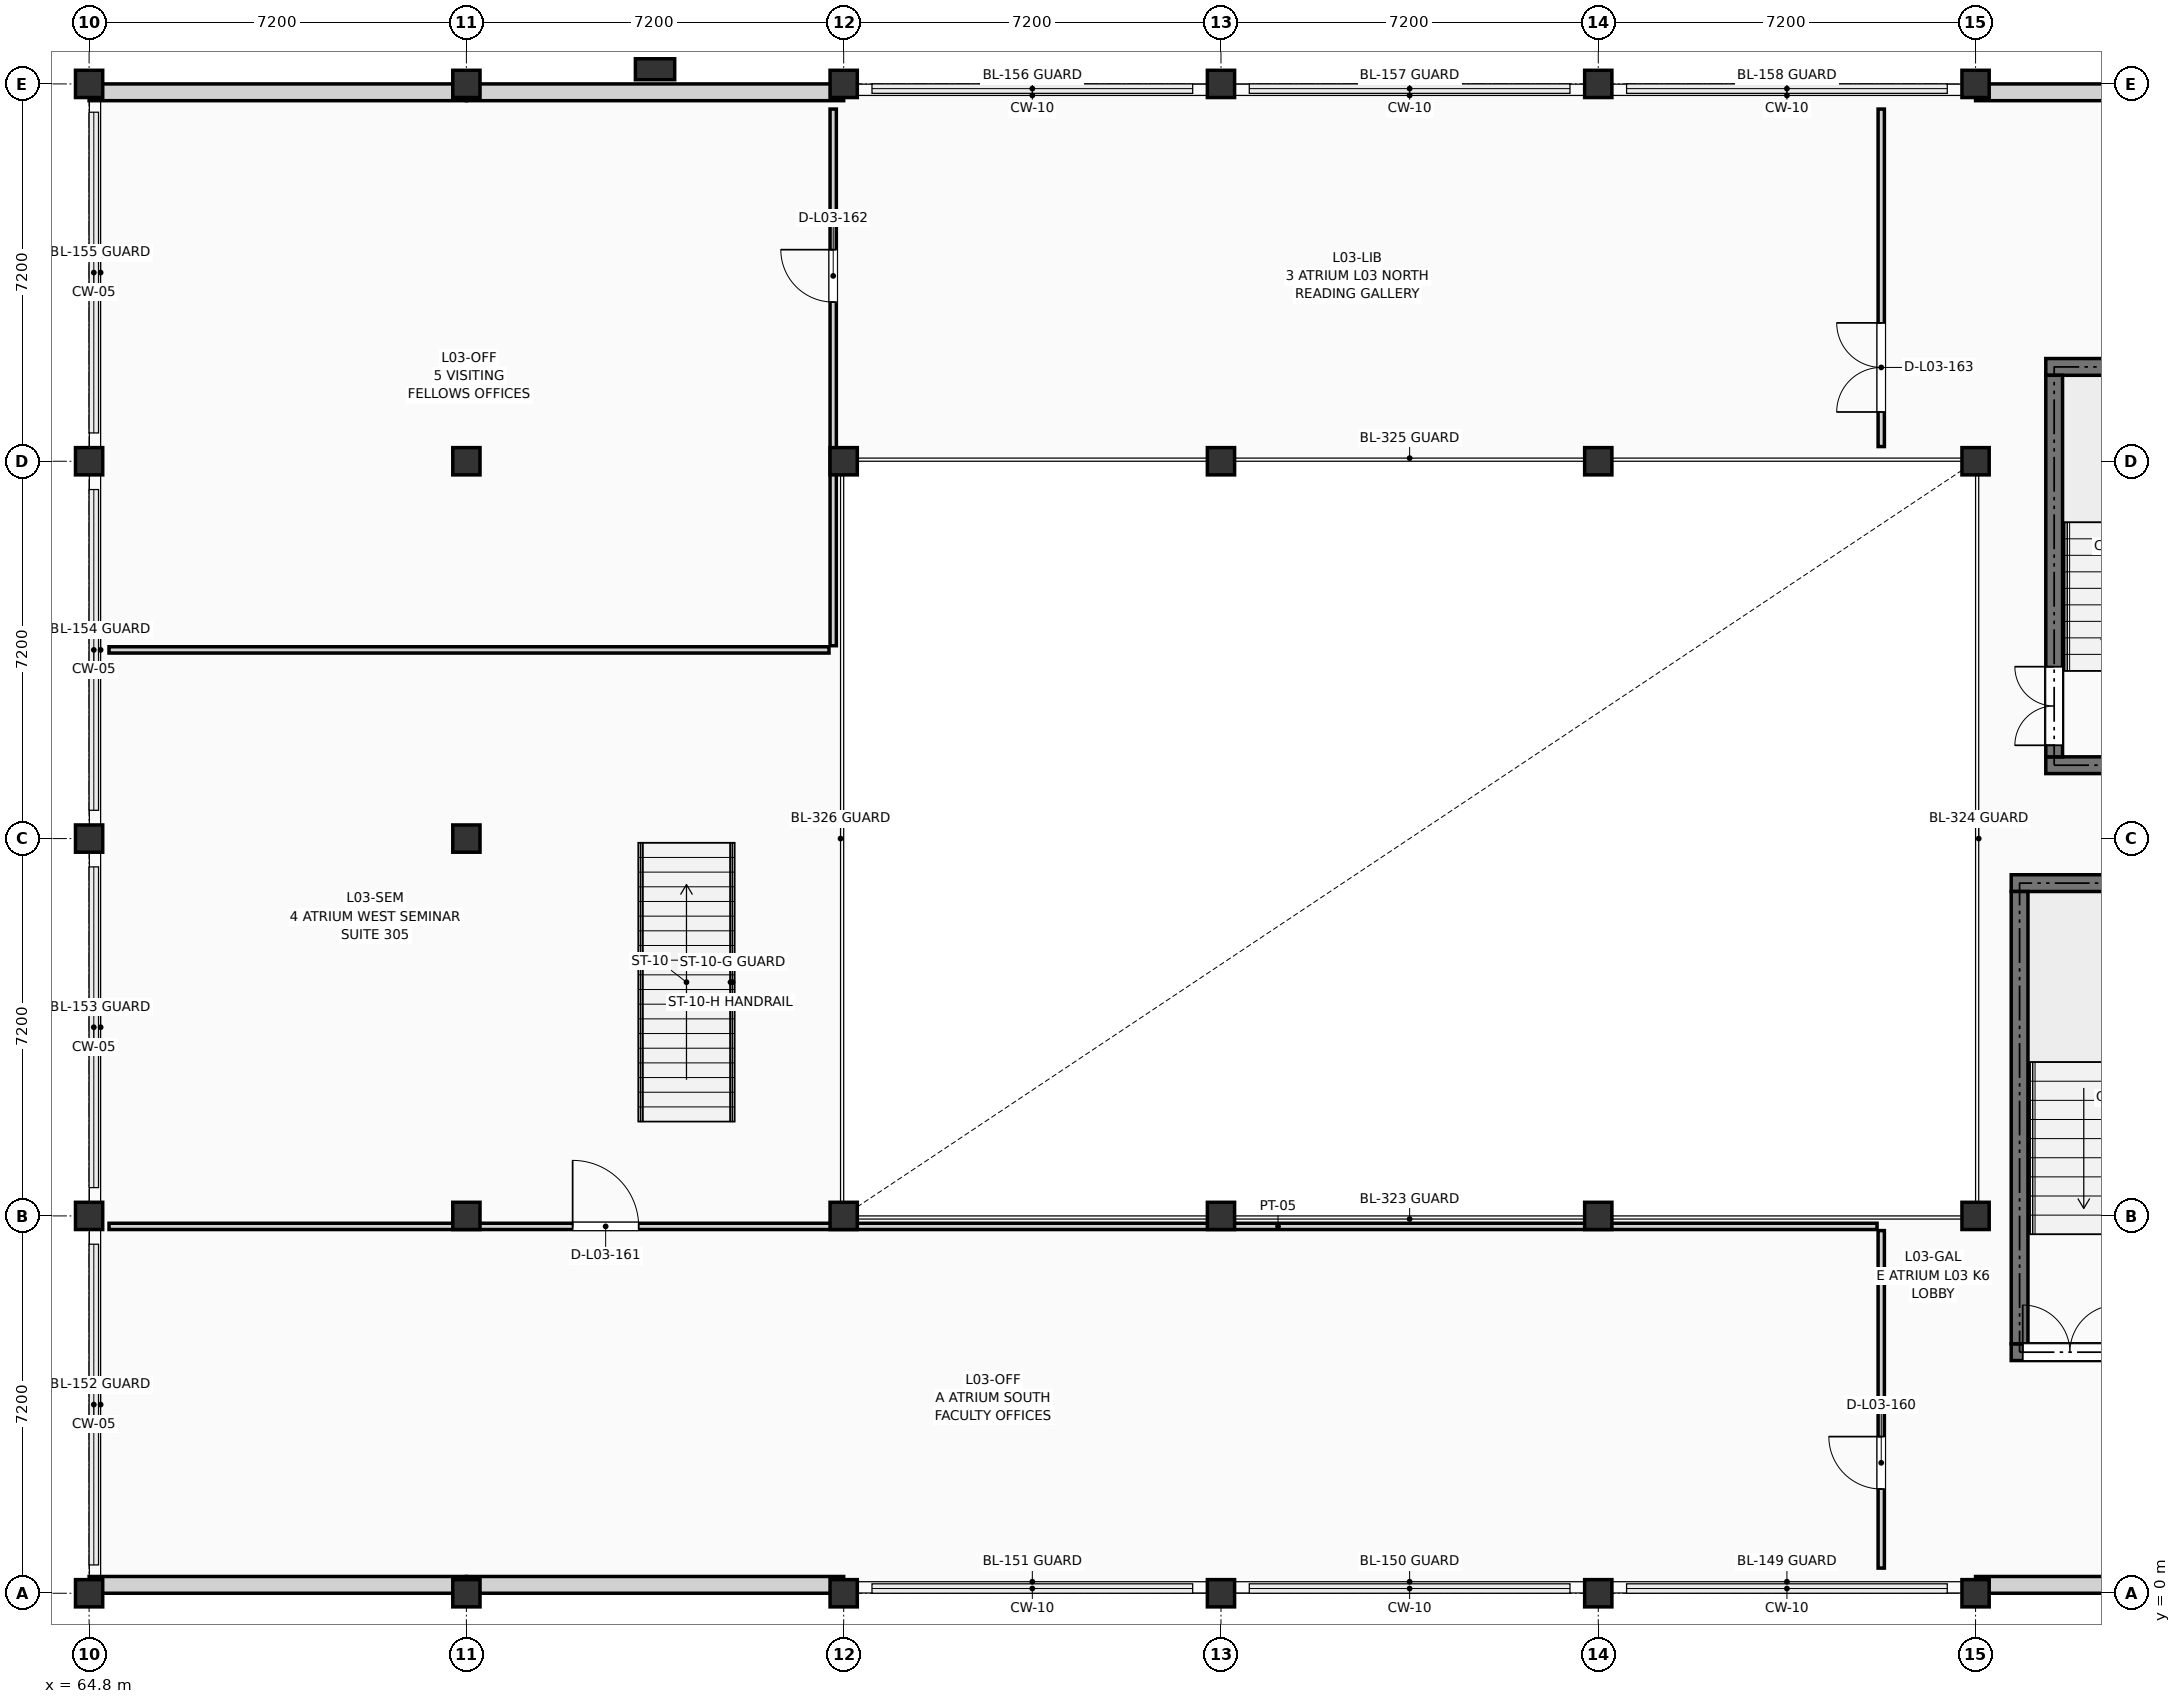
"""IFC4 building model, lengths in metres.
Left out: names, types, materials, properties, quantities, classifications, styles, units other than length and angle.
Written with IfcOpenShell. Run it as: python <this file> out.ifc"""

import sys

from ifc_helpers import new_model, si_unit, direction, frame, frame_2d, origin, origin_2d, place, context, subcontext, project, spatial, rectangle, extrude, element, fill, save


model = new_model("IFC4")
c1 = context("Model", 3, precision=1e-05, world=origin(), true_north=direction((0.0, 1.0)))
c2 = subcontext(c1, "Body", "Model", "MODEL_VIEW")
j1 = project(units=[si_unit("LENGTHUNIT", "METRE"), si_unit("PLANEANGLEUNIT", "RADIAN")], contexts=[c1])
p1 = place(None, origin())
s1 = spatial("IfcSite", under=j1, at=p1, CompositionType="ELEMENT")
p2 = place(p1, origin())
s2 = spatial("IfcBuilding", under=s1, at=p2, CompositionType="ELEMENT")
p3 = place(p2, frame((0.0, 0.0, 12.15)))
s3 = spatial("IfcBuildingStorey", under=s2, at=p3, CompositionType="ELEMENT", Elevation=12.15)
for number, where, z_axis, x_axis in (
    (1, (64.8, 0.0, 0.0), (0.0, 0.0, 1.0), (1.0, 0.0, 0.0)),
    (2, (64.8, 7.2, 0.0), (0.0, 0.0, 1.0), (1.0, 0.0, 0.0)),
    (3, (64.8, 14.4, 0.0), (0.0, 0.0, 1.0), (1.0, 0.0, 0.0)),
    (4, (64.8, 21.6, 0.0), (0.0, 0.0, 1.0), (1.0, 0.0, 0.0)),
    (5, (64.8, 28.8, 0.0), (0.0, 0.0, 1.0), (1.0, 0.0, 0.0)),
    (6, (72.0, 0.0, 0.0), (0.0, 0.0, 1.0), (1.0, 0.0, 0.0)),
    (7, (72.0, 7.2, 0.0), (0.0, 0.0, 1.0), (1.0, 0.0, 0.0)),
    (8, (72.0, 14.4, 0.0), (0.0, 0.0, 1.0), (1.0, 0.0, 0.0)),
    (9, (72.0, 21.6, 0.0), (0.0, 0.0, 1.0), (1.0, 0.0, 0.0)),
    (10, (72.0, 28.8, 0.0), (0.0, 0.0, 1.0), (1.0, 0.0, 0.0)),
    (11, (79.2, 0.0, 0.0), (0.0, 0.0, 1.0), (1.0, 0.0, 0.0)),
    (12, (79.2, 7.2, 0.0), (0.0, 0.0, 1.0), (1.0, 0.0, 0.0)),
    (13, (79.2, 21.6, 0.0), (0.0, 0.0, 1.0), (1.0, 0.0, 0.0)),
    (14, (79.2, 28.8, 0.0), (0.0, 0.0, 1.0), (1.0, 0.0, 0.0)),
    (15, (86.4, 0.0, 0.0), (0.0, 0.0, 1.0), (1.0, 0.0, 0.0)),
    (16, (86.4, 7.2, 0.0), (0.0, 0.0, 1.0), (1.0, 0.0, 0.0)),
    (17, (86.4, 21.6, 0.0), (0.0, 0.0, 1.0), (1.0, 0.0, 0.0)),
    (18, (86.4, 28.8, 0.0), (0.0, 0.0, 1.0), (1.0, 0.0, 0.0)),
    (19, (93.6, 0.0, 0.0), (0.0, 0.0, 1.0), (1.0, 0.0, 0.0)),
    (20, (93.6, 7.2, 0.0), (0.0, 0.0, 1.0), (1.0, 0.0, 0.0)),
    (21, (93.6, 21.6, 0.0), (0.0, 0.0, 1.0), (1.0, 0.0, 0.0)),
    (22, (93.6, 28.8, 0.0), (0.0, 0.0, 1.0), (1.0, 0.0, 0.0)),
    (23, (100.8, 0.0, 0.0), (0.0, 0.0, 1.0), (1.0, 0.0, 0.0)),
    (24, (100.8, 7.2, 0.0), (0.0, 0.0, 1.0), (1.0, 0.0, 0.0)),
    (25, (100.8, 21.6, 0.0), (0.0, 0.0, 1.0), (1.0, 0.0, 0.0)),
    (26, (100.8, 28.8, 0.0), (0.0, 0.0, 1.0), (1.0, 0.0, 0.0)),
):
    element("IfcColumn", number, at=place(p3, frame(where, z_axis=z_axis, x_axis=x_axis)), inside=s3, PredefinedType="COLUMN", context=c2, shape_type="SweptSolid", body=[
        extrude(rectangle(XDim=0.52, YDim=0.52, at=origin_2d()), origin(), (0.0, 0.0, 1.0), 3.6),
    ])
p4 = place(p3, frame((75.6, 29.08, 0.0), z_axis=(0.0, 0.0, 1.0), x_axis=(0.0, 1.0, 0.0)))
e27 = element("IfcColumn", 27, at=p4, inside=s3, PredefinedType="PILASTER", context=c2, shape_type="SweptSolid", body=[
    extrude(rectangle(XDim=0.4, YDim=0.75, at=origin_2d()), origin(), (0.0, 0.0, 1.0), 3.6),
])
for number, where, z_axis, x_axis in (
    (28, (100.8, 0.16, 0.0), (0.0, 0.0, 1.0), (1.0, 0.0, 0.0)),
    (29, (72.0, 0.16, 0.0), (0.0, 0.0, 1.0), (1.0, 0.0, 0.0)),
    (30, (64.8, 0.16, 0.0), (0.0, 0.0, 1.0), (1.0, 0.0, 0.0)),
    (31, (64.8, 28.64, 0.0), (0.0, 0.0, 1.0), (1.0, 0.0, 0.0)),
    (32, (72.0, 28.64, 0.0), (0.0, 0.0, 1.0), (1.0, 0.0, 0.0)),
    (33, (100.8, 28.64, 0.0), (0.0, 0.0, 1.0), (1.0, 0.0, 0.0)),
):
    element("IfcWall", number, at=place(p3, frame(where, z_axis=z_axis, x_axis=x_axis)), inside=s3, PredefinedType="SOLIDWALL", context=c2, shape_type="SweptSolid", body=[
        extrude(rectangle(XDim=7.2, YDim=0.32, at=frame_2d((3.6, 0.0))), origin(), (0.0, 0.0, 1.0), 2.84),
    ])
for number, where, z_axis, x_axis in (
    (34, (102.14, 15.8, 0.0), (0.0, 0.0, 1.0), (1.0, 0.0, 0.0)),
    (35, (102.14, 23.4, 0.0), (0.0, 0.0, 1.0), (1.0, 0.0, 0.0)),
):
    element("IfcWall", number, at=place(p3, frame(where, z_axis=z_axis, x_axis=x_axis)), inside=s3, PredefinedType="SHEAR", context=c2, shape_type="SweptSolid", body=[
        extrude(rectangle(XDim=4.44, YDim=0.32, at=frame_2d((2.22, 0.0))), origin(), (0.0, 0.0, 1.0), 3.39),
    ])
p5 = place(p3, frame((102.3, 15.96, 0.0), z_axis=(0.0, 0.0, 1.0), x_axis=(0.0, 1.0, 0.0)))
e36 = element("IfcWall", 36, at=p5, inside=s3, PredefinedType="SHEAR", context=c2, shape_type="SweptSolid", body=[
    extrude(rectangle(XDim=7.28, YDim=0.32, at=frame_2d((3.64, 0.0))), origin(), (0.0, 0.0, 1.0), 3.39),
])
p6 = place(p5, frame((0.22, 0.0, 0.0)))
e37 = element("IfcOpeningElement", 37, at=p6, cuts=e36, PredefinedType="OPENING", context=c2, shape_type="SweptSolid", body=[
    extrude(rectangle(XDim=1.5, YDim=2.2, at=frame_2d((0.75, 1.1))), frame((0.0, 0.172, 0.0), z_axis=(0.0, -1.0, 0.0), x_axis=(1.0, 0.0, 0.0)), (0.0, 0.0, 1.0), 0.344),
])
p7 = place(p3, frame((101.48, 4.6, 0.0), z_axis=(0.0, 0.0, 1.0), x_axis=(1.0, 0.0, 0.0)))
e38 = element("IfcWall", 38, at=p7, inside=s3, PredefinedType="SHEAR", context=c2, shape_type="SweptSolid", body=[
    extrude(rectangle(XDim=5.84, YDim=0.32, at=frame_2d((2.92, 0.0))), origin(), (0.0, 0.0, 1.0), 3.39),
])
p8 = place(p7, frame((0.22, 0.0, 0.0)))
e39 = element("IfcOpeningElement", 39, at=p8, cuts=e38, PredefinedType="OPENING", context=c2, shape_type="SweptSolid", body=[
    extrude(rectangle(XDim=1.8, YDim=2.2, at=frame_2d((0.9, 1.1))), frame((0.0, 0.172, 0.0), z_axis=(0.0, -1.0, 0.0), x_axis=(1.0, 0.0, 0.0)), (0.0, 0.0, 1.0), 0.344),
])
p9 = place(p3, frame((101.48, 13.55, 0.0), z_axis=(0.0, 0.0, 1.0), x_axis=(1.0, 0.0, 0.0)))
e40 = element("IfcWall", 40, at=p9, inside=s3, PredefinedType="SHEAR", context=c2, shape_type="SweptSolid", body=[
    extrude(rectangle(XDim=5.84, YDim=0.32, at=frame_2d((2.92, 0.0))), origin(), (0.0, 0.0, 1.0), 3.39),
])
p10 = place(p3, frame((101.64, 4.76, 0.0), z_axis=(0.0, 0.0, 1.0), x_axis=(0.0, 1.0, 0.0)))
e41 = element("IfcWall", 41, at=p10, inside=s3, PredefinedType="SHEAR", context=c2, shape_type="SweptSolid", body=[
    extrude(rectangle(XDim=8.63, YDim=0.32, at=frame_2d((4.315, 0.0))), origin(), (0.0, 0.0, 1.0), 3.39),
])
p11 = place(p3, frame((99.0, 0.48, 0.0), z_axis=(0.0, 0.0, 1.0), x_axis=(0.0, 1.0, 0.0)))
e42 = element("IfcWall", 42, at=p11, inside=s3, PredefinedType="PARTITIONING", context=c2, shape_type="SweptSolid", body=[
    extrude(rectangle(XDim=6.44, YDim=0.12, at=frame_2d((3.22, 0.0))), origin(), (0.0, 0.0, 1.0), 3.375),
])
p12 = place(p11, frame((1.509, 0.0, 0.0)))
e43 = element("IfcOpeningElement", 43, at=p12, cuts=e42, PredefinedType="OPENING", context=c2, shape_type="SweptSolid", body=[
    extrude(rectangle(XDim=1.0, YDim=2.15, at=frame_2d((0.5, 1.075))), frame((0.0, 0.072, 0.0), z_axis=(0.0, -1.0, 0.0), x_axis=(1.0, 0.0, 0.0)), (0.0, 0.0, 1.0), 0.144),
])
p13 = place(p3, frame((65.18, 7.0, 0.0), z_axis=(0.0, 0.0, 1.0), x_axis=(1.0, 0.0, 0.0)))
e44 = element("IfcWall", 44, at=p13, inside=s3, PredefinedType="PARTITIONING", context=c2, shape_type="SweptSolid", body=[
    extrude(rectangle(XDim=33.74, YDim=0.12, at=frame_2d((16.87, 0.0))), origin(), (0.0, 0.0, 1.0), 2.595),
])
p14 = place(p13, frame((8.847, 0.0, 0.0)))
e45 = element("IfcOpeningElement", 45, at=p14, cuts=e44, PredefinedType="OPENING", context=c2, shape_type="SweptSolid", body=[
    extrude(rectangle(XDim=1.26, YDim=2.18, at=frame_2d((0.63, 1.09))), frame((0.0, 0.072, 0.0), z_axis=(0.0, -1.0, 0.0), x_axis=(1.0, 0.0, 0.0)), (0.0, 0.0, 1.0), 0.144),
])
p15 = place(p3, frame((65.18, 18.0, 0.0), z_axis=(0.0, 0.0, 1.0), x_axis=(1.0, 0.0, 0.0)))
e46 = element("IfcWall", 46, at=p15, inside=s3, PredefinedType="PARTITIONING", context=c2, shape_type="SweptSolid", body=[
    extrude(rectangle(XDim=13.74, YDim=0.12, at=frame_2d((6.87, 0.0))), origin(), (0.0, 0.0, 1.0), 2.955),
])
p16 = place(p3, frame((79.0, 18.08, 0.0), z_axis=(0.0, 0.0, 1.0), x_axis=(0.0, 1.0, 0.0)))
e47 = element("IfcWall", 47, at=p16, inside=s3, PredefinedType="PARTITIONING", context=c2, shape_type="SweptSolid", body=[
    extrude(rectangle(XDim=10.24, YDim=0.12, at=frame_2d((5.12, 0.0))), origin(), (0.0, 0.0, 1.0), 3.375),
])
p17 = place(p16, frame((6.557, 0.0, 0.0)))
e48 = element("IfcOpeningElement", 48, at=p17, cuts=e47, PredefinedType="OPENING", context=c2, shape_type="SweptSolid", body=[
    extrude(rectangle(XDim=1.0, YDim=2.15, at=frame_2d((0.5, 1.075))), frame((0.0, 0.072, 0.0), z_axis=(0.0, -1.0, 0.0), x_axis=(1.0, 0.0, 0.0)), (0.0, 0.0, 1.0), 0.144),
])
p18 = place(p3, frame((99.0, 21.88, 0.0), z_axis=(0.0, 0.0, 1.0), x_axis=(0.0, 1.0, 0.0)))
e49 = element("IfcWall", 49, at=p18, inside=s3, PredefinedType="PARTITIONING", context=c2, shape_type="SweptSolid", body=[
    extrude(rectangle(XDim=6.44, YDim=0.12, at=frame_2d((3.22, 0.0))), origin(), (0.0, 0.0, 1.0), 3.375),
])
p19 = place(p18, frame((0.66, 0.0, 0.0)))
e50 = element("IfcOpeningElement", 50, at=p19, cuts=e49, PredefinedType="OPENING", context=c2, shape_type="SweptSolid", body=[
    extrude(rectangle(XDim=1.7, YDim=2.28, at=frame_2d((0.85, 1.14))), frame((0.0, 0.072, 0.0), z_axis=(0.0, -1.0, 0.0), x_axis=(1.0, 0.0, 0.0)), (0.0, 0.0, 1.0), 0.144),
])
p20 = place(p6, origin())
e51 = element("IfcDoor", 51, at=p20, inside=s3, OperationType="DOUBLE_DOOR_SINGLE_SWING", PredefinedType="DOOR", context=c2, shape_type="SweptSolid", body=[
    extrude(rectangle(XDim=1.5, YDim=2.2, at=frame_2d((0.75, 1.1))), frame((0.0, 0.025, 0.0), z_axis=(0.0, -1.0, 0.0), x_axis=(1.0, 0.0, 0.0)), (0.0, 0.0, 1.0), 0.05),
])
fill(e37, e51)
p21 = place(p8, origin())
e52 = element("IfcDoor", 52, at=p21, inside=s3, OperationType="DOUBLE_DOOR_SINGLE_SWING", PredefinedType="DOOR", context=c2, shape_type="SweptSolid", body=[
    extrude(rectangle(XDim=1.8, YDim=2.2, at=frame_2d((0.9, 1.1))), frame((0.0, 0.025, 0.0), z_axis=(0.0, -1.0, 0.0), x_axis=(1.0, 0.0, 0.0)), (0.0, 0.0, 1.0), 0.05),
])
fill(e39, e52)
p22 = place(p12, origin())
e53 = element("IfcDoor", 53, at=p22, inside=s3, OperationType="SINGLE_SWING_RIGHT", PredefinedType="DOOR", context=c2, shape_type="SweptSolid", body=[
    extrude(rectangle(XDim=1.0, YDim=2.15, at=frame_2d((0.5, 1.075))), frame((0.0, 0.025, 0.0), z_axis=(0.0, -1.0, 0.0), x_axis=(1.0, 0.0, 0.0)), (0.0, 0.0, 1.0), 0.05),
])
fill(e43, e53)
p23 = place(p14, origin())
e54 = element("IfcDoor", 54, at=p23, inside=s3, OperationType="SINGLE_SWING_LEFT", PredefinedType="DOOR", context=c2, shape_type="SweptSolid", body=[
    extrude(rectangle(XDim=1.26, YDim=2.18, at=frame_2d((0.63, 1.09))), frame((0.0, 0.025, 0.0), z_axis=(0.0, -1.0, 0.0), x_axis=(1.0, 0.0, 0.0)), (0.0, 0.0, 1.0), 0.05),
])
fill(e45, e54)
p24 = place(p17, origin())
e55 = element("IfcDoor", 55, at=p24, inside=s3, OperationType="SINGLE_SWING_RIGHT", PredefinedType="DOOR", context=c2, shape_type="SweptSolid", body=[
    extrude(rectangle(XDim=1.0, YDim=2.15, at=frame_2d((0.5, 1.075))), frame((0.0, 0.025, 0.0), z_axis=(0.0, -1.0, 0.0), x_axis=(1.0, 0.0, 0.0)), (0.0, 0.0, 1.0), 0.05),
])
fill(e48, e55)
p25 = place(p19, origin())
e56 = element("IfcDoor", 56, at=p25, inside=s3, OperationType="DOUBLE_DOOR_SINGLE_SWING", PredefinedType="DOOR", context=c2, shape_type="SweptSolid", body=[
    extrude(rectangle(XDim=1.7, YDim=2.28, at=frame_2d((0.85, 1.14))), frame((0.0, 0.025, 0.0), z_axis=(0.0, -1.0, 0.0), x_axis=(1.0, 0.0, 0.0)), (0.0, 0.0, 1.0), 0.05),
])
fill(e50, e56)
save(model, sys.argv[1])
